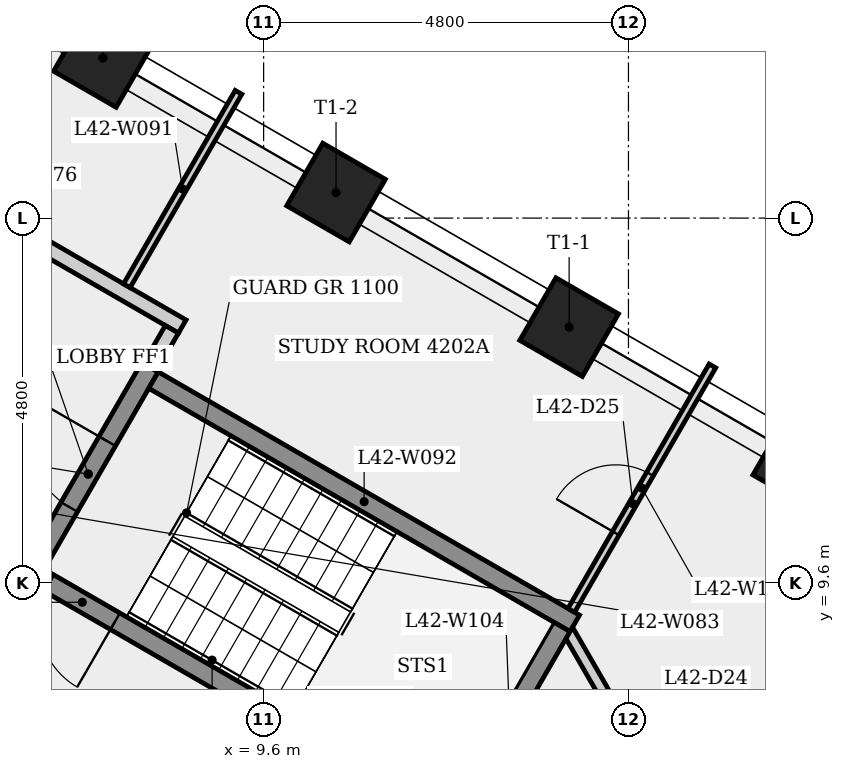
"""IFC4 building model, lengths in metres.
Left out: names, types, materials, properties, quantities, classifications, styles, units other than length and angle.
Written with IfcOpenShell. Run it as: python <this file> out.ifc"""

import sys

from ifc_helpers import new_model, si_unit, direction, frame, frame_2d, origin, origin_2d, place, context, subcontext, project, spatial, rectangle, extrude, element, fill, save


model = new_model("IFC4")
c1 = context("Model", 3, precision=1e-05, world=origin(), true_north=direction((0.0, 1.0)))
c2 = subcontext(c1, "Body", "Model", "MODEL_VIEW")
j1 = project(units=[si_unit("LENGTHUNIT", "METRE"), si_unit("PLANEANGLEUNIT", "RADIAN")], contexts=[c1])
p1 = place(None, origin())
s1 = spatial("IfcSite", under=j1, at=p1, CompositionType="ELEMENT")
p2 = place(p1, origin())
s2 = spatial("IfcBuilding", under=s1, at=p2, CompositionType="ELEMENT")
p3 = place(p2, frame((0.0, 0.0, 159.5)))
s3 = spatial("IfcBuildingStorey", under=s2, at=p3, CompositionType="ELEMENT", Elevation=159.5)
p4 = place(p3, frame((9.35, 5.225, 0.0), z_axis=(0.0, 0.0, 1.0), x_axis=(-0.866023993627, 0.500002442456, 0.0)))
e1 = element("IfcWall", 1, at=p4, inside=s3, PredefinedType="SHEAR", context=c2, shape_type="SweptSolid", body=[
    extrude(rectangle(XDim=10.97, YDim=0.6, at=frame_2d((5.485, 0.0))), origin(), (0.0, 0.0, 1.0), 3.4),
])
p5 = place(p4, frame((8.325, 0.0, 0.0)))
e2 = element("IfcOpeningElement", 2, at=p5, cuts=e1, PredefinedType="OPENING", context=c2, shape_type="SweptSolid", body=[
    extrude(rectangle(XDim=0.9, YDim=2.1, at=frame_2d((0.45, 1.05))), frame((0.0, 0.31, 0.0), z_axis=(0.0, -1.0, 0.0), x_axis=(1.0, 0.0, 0.0)), (0.0, 0.0, 1.0), 0.62),
])
p6 = place(p4, frame((1.518, 0.0, 0.0)))
e3 = element("IfcOpeningElement", 3, at=p6, cuts=e1, PredefinedType="OPENING", context=c2, shape_type="SweptSolid", body=[
    extrude(rectangle(XDim=0.9, YDim=2.1, at=frame_2d((0.45, 1.05))), frame((0.0, 0.31, 0.0), z_axis=(0.0, -1.0, 0.0), x_axis=(1.0, 0.0, 0.0)), (0.0, 0.0, 1.0), 0.62),
])
for number, where, z_axis, x_axis in (
    (4, (16.687, 11.195, 0.0), (0.0, 0.0, 1.0), (0.5, 0.866, 0.0)),
    (5, (13.62, 12.965, 0.0), (0.0, 0.0, 1.0), (0.5, 0.866, 0.0)),
    (6, (10.552, 14.736, 0.0), (0.0, 0.0, 1.0), (0.5, 0.866, 0.0)),
    (7, (7.486, 16.507, 0.0), (0.0, 0.0, 1.0), (0.5, 0.866, 0.0)),
):
    element("IfcColumn", number, at=place(p3, frame(where, z_axis=z_axis, x_axis=x_axis)), inside=s3, PredefinedType="COLUMN", context=c2, shape_type="SweptSolid", body=[
        extrude(rectangle(XDim=0.95, YDim=0.95, at=origin_2d()), origin(), (0.0, 0.0, 1.0), 3.4),
    ])
p7 = place(p3, frame((4.459, 15.323, 0.0), z_axis=(0.0, 0.0, 1.0), x_axis=(0.866016039709, -0.500016218704, 0.0)))
e8 = element("IfcWall", 8, at=p7, inside=s3, PredefinedType="PARTITIONING", context=c2, shape_type="SweptSolid", body=[
    extrude(rectangle(XDim=4.7, YDim=0.2, at=frame_2d((2.35, 0.0))), origin(), (0.0, 0.0, 1.0), 3.05),
])
p8 = place(p3, frame((6.48, 9.624, 0.0), z_axis=(0.0, 0.0, 1.0), x_axis=(0.500017246033, 0.866015446554, 0.0)))
e9 = element("IfcWall", 9, at=p8, inside=s3, PredefinedType="SHEAR", context=c2, shape_type="SweptSolid", body=[
    extrude(rectangle(XDim=3.25, YDim=0.25, at=frame_2d((1.625, 0.0))), origin(), (0.0, 0.0, 1.0), 3.05),
])
p9 = place(p8, frame((1.125, 0.0, 0.0)))
e10 = element("IfcOpeningElement", 10, at=p9, cuts=e9, PredefinedType="OPENING", context=c2, shape_type="SweptSolid", body=[
    extrude(rectangle(XDim=1.0, YDim=2.1, at=frame_2d((0.5, 1.05))), frame((0.0, 0.135, 0.0), z_axis=(0.0, -1.0, 0.0), x_axis=(1.0, 0.0, 0.0)), (0.0, 0.0, 1.0), 0.27),
])
p10 = place(p3, frame((7.8, 13.51, 0.0), z_axis=(0.0, 0.0, 1.0), x_axis=(0.499945384066, 0.866056934013, 0.0)))
e11 = element("IfcWall", 11, at=p10, inside=s3, PredefinedType="PARTITIONING", context=c2, shape_type="SweptSolid", body=[
    extrude(rectangle(XDim=2.939, YDim=0.1, at=frame_2d((1.469, 0.0))), origin(), (0.0, 0.0, 1.0), 3.05),
])
p11 = place(p3, frame((8.151, 12.268, 0.0), z_axis=(0.0, 0.0, 1.0), x_axis=(0.866025499775, -0.499999833739, 0.0)))
e12 = element("IfcWall", 12, at=p11, inside=s3, PredefinedType="SHEAR", context=c2, shape_type="SweptSolid", body=[
    extrude(rectangle(XDim=6.4, YDim=0.25, at=frame_2d((3.2, 0.0))), origin(), (0.0, 0.0, 1.0), 3.05),
])
p12 = place(p3, frame((8.393, 12.937, 0.0), z_axis=(0.0, 0.0, 1.0), x_axis=(-0.500065409566, -0.86598763626, 0.0)))
e13 = element("IfcWall", 13, at=p12, inside=s3, PredefinedType="PARTITIONING", context=c2, shape_type="SweptSolid", body=[
    extrude(rectangle(XDim=0.575, YDim=0.2, at=frame_2d((0.288, 0.0))), origin(), (0.0, 0.0, 1.0), 3.05),
])
p13 = place(p3, frame((12.194, 6.47, 0.0), z_axis=(0.0, 0.0, 1.0), x_axis=(-0.866025499775, 0.499999833739, 0.0)))
e14 = element("IfcWall", 14, at=p13, inside=s3, PredefinedType="SHEAR", context=c2, shape_type="SweptSolid", body=[
    extrude(rectangle(XDim=6.4, YDim=0.25, at=frame_2d((3.2, 0.0))), origin(), (0.0, 0.0, 1.0), 3.05),
])
p14 = place(p13, frame((5.25, 0.0, 0.0)))
e15 = element("IfcOpeningElement", 15, at=p14, cuts=e14, PredefinedType="OPENING", context=c2, shape_type="SweptSolid", body=[
    extrude(rectangle(XDim=1.0, YDim=2.1, at=frame_2d((0.5, 1.05))), frame((0.0, 0.135, 0.0), z_axis=(0.0, -1.0, 0.0), x_axis=(1.0, 0.0, 0.0)), (0.0, 0.0, 1.0), 0.27),
])
p15 = place(p3, frame((13.611, 8.959, 0.0), z_axis=(0.0, 0.0, 1.0), x_axis=(0.50000642917, -0.866021691869, 0.0)))
e16 = element("IfcWall", 16, at=p15, inside=s3, PredefinedType="PARTITIONING", context=c2, shape_type="SweptSolid", body=[
    extrude(rectangle(XDim=4.44, YDim=0.15, at=frame_2d((2.22, 0.0))), origin(), (0.0, 0.0, 1.0), 3.05),
])
p16 = place(p15, frame((1.665, 0.0, 0.0)))
e17 = element("IfcOpeningElement", 17, at=p16, cuts=e16, PredefinedType="OPENING", context=c2, shape_type="SweptSolid", body=[
    extrude(rectangle(XDim=1.0, YDim=2.1, at=frame_2d((0.5, 1.05))), frame((0.0, 0.085, 0.0), z_axis=(0.0, -1.0, 0.0), x_axis=(1.0, 0.0, 0.0)), (0.0, 0.0, 1.0), 0.17),
])
p17 = place(p3, frame((12.148, 6.641, 0.0), z_axis=(0.0, 0.0, 1.0), x_axis=(0.500034990121, 0.866005201286, 0.0)))
e18 = element("IfcWall", 18, at=p17, inside=s3, PredefinedType="SHEAR", context=c2, shape_type="SweptSolid", body=[
    extrude(rectangle(XDim=2.75, YDim=0.25, at=frame_2d((1.375, 0.0))), origin(), (0.0, 0.0, 1.0), 3.05),
])
p18 = place(p3, frame((13.648, 9.239, 0.0), z_axis=(0.0, 0.0, 1.0), x_axis=(0.500048687089, 0.865997292456, 0.0)))
e19 = element("IfcWall", 19, at=p18, inside=s3, PredefinedType="PARTITIONING", context=c2, shape_type="SweptSolid", body=[
    extrude(rectangle(XDim=3.714, YDim=0.1, at=frame_2d((1.857, 0.0))), origin(), (0.0, 0.0, 1.0), 3.05),
])
p19 = place(p18, frame((1.171, 0.0, 0.0)))
e20 = element("IfcOpeningElement", 20, at=p19, cuts=e19, PredefinedType="OPENING", context=c2, shape_type="SweptSolid", body=[
    extrude(rectangle(XDim=0.9, YDim=2.1, at=frame_2d((0.45, 1.05))), frame((0.0, 0.06, 0.0), z_axis=(0.0, -1.0, 0.0), x_axis=(1.0, 0.0, 0.0)), (0.0, 0.0, 1.0), 0.12),
])
p20 = place(p14, origin())
e21 = element("IfcDoor", 21, at=p20, inside=s3, OperationType="SINGLE_SWING_LEFT", PredefinedType="DOOR", context=c2, shape_type="SweptSolid", body=[
    extrude(rectangle(XDim=1.0, YDim=2.1, at=frame_2d((0.5, 1.05))), frame((0.0, 0.025, 0.0), z_axis=(0.0, -1.0, 0.0), x_axis=(1.0, 0.0, 0.0)), (0.0, 0.0, 1.0), 0.05),
])
fill(e15, e21)
p21 = place(p9, origin())
e22 = element("IfcDoor", 22, at=p21, inside=s3, OperationType="SINGLE_SWING_RIGHT", PredefinedType="DOOR", context=c2, shape_type="SweptSolid", body=[
    extrude(rectangle(XDim=1.0, YDim=2.1, at=frame_2d((0.5, 1.05))), frame((0.0, 0.025, 0.0), z_axis=(0.0, -1.0, 0.0), x_axis=(1.0, 0.0, 0.0)), (0.0, 0.0, 1.0), 0.05),
])
fill(e10, e22)
p22 = place(p19, origin())
e23 = element("IfcDoor", 23, at=p22, inside=s3, OperationType="SINGLE_SWING_LEFT", PredefinedType="DOOR", context=c2, shape_type="SweptSolid", body=[
    extrude(rectangle(XDim=0.9, YDim=2.1, at=frame_2d((0.45, 1.05))), frame((0.0, 0.025, 0.0), z_axis=(0.0, -1.0, 0.0), x_axis=(1.0, 0.0, 0.0)), (0.0, 0.0, 1.0), 0.05),
])
fill(e20, e23)
save(model, sys.argv[1])
